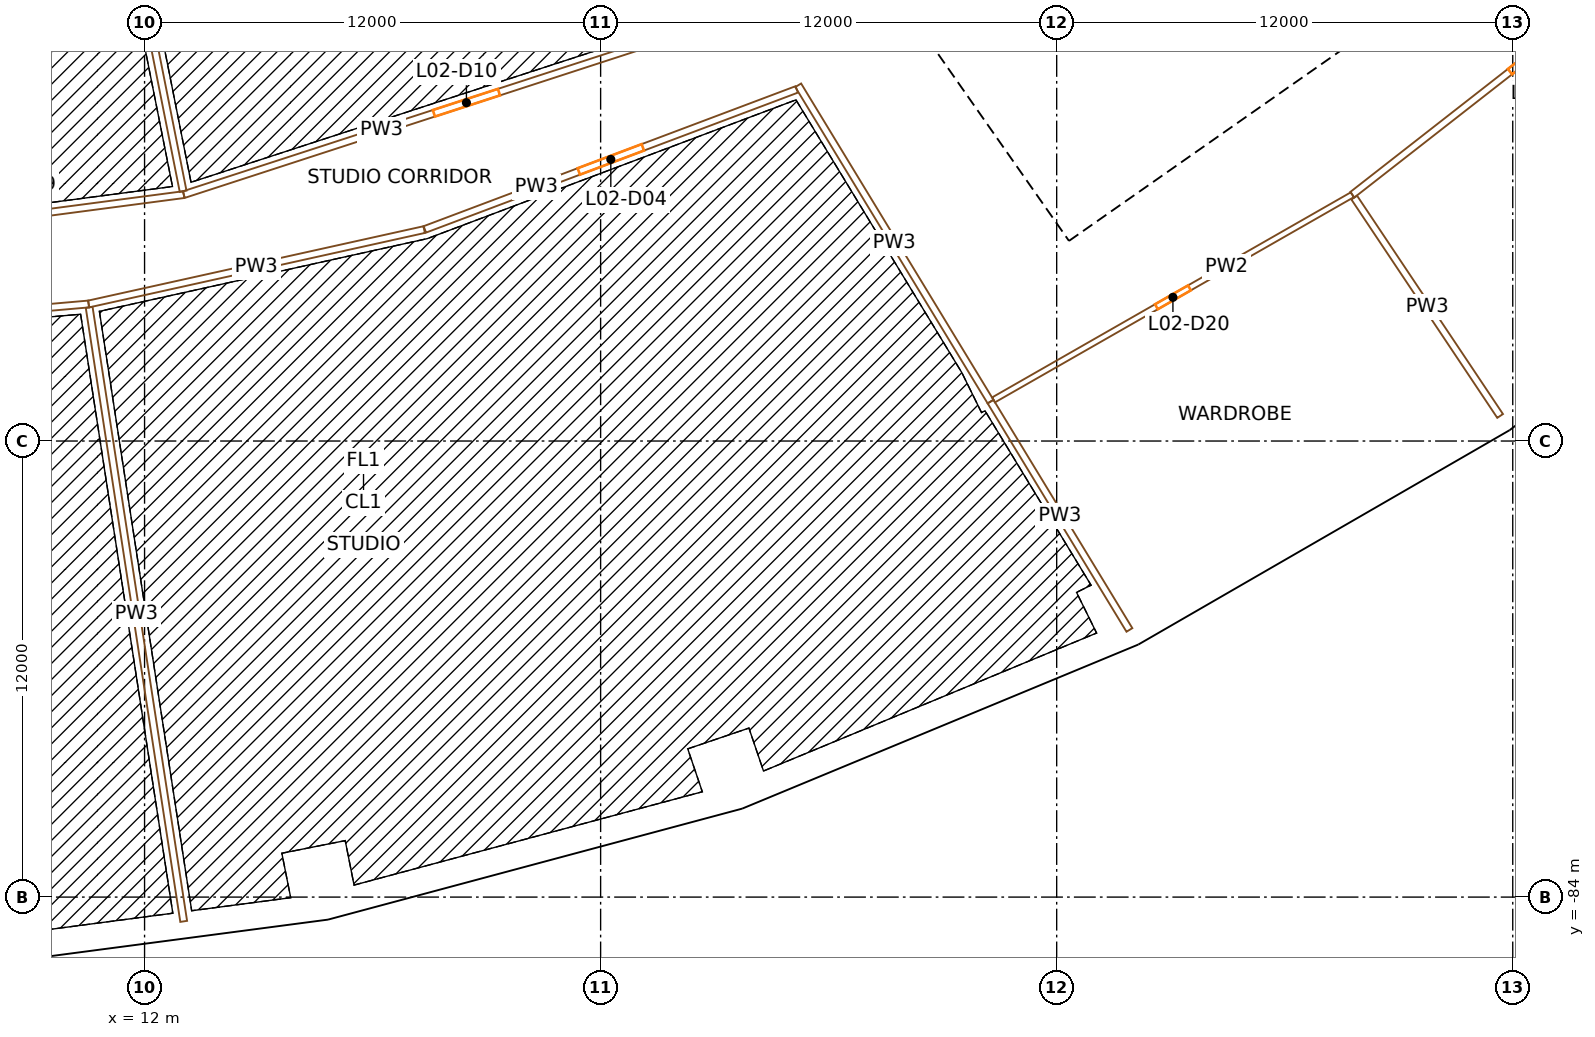
"""IFC4 building model, lengths in metres.
Left out: names, types, materials, properties, quantities, classifications, styles, units other than length and angle.
Written with IfcOpenShell. Run it as: python <this file> out.ifc"""

import sys

from ifc_helpers import new_model, si_unit, direction, frame, frame_2d, origin, origin_2d, place, context, subcontext, project, spatial, rectangle, extrude, element, fill, save


model = new_model("IFC4")
c1 = context("Model", 3, precision=1e-05, world=origin(), true_north=direction((0.0, 1.0)))
c2 = subcontext(c1, "Body", "Model", "MODEL_VIEW")
j1 = project(units=[si_unit("LENGTHUNIT", "METRE"), si_unit("PLANEANGLEUNIT", "RADIAN")], contexts=[c1])
p1 = place(None, origin())
s1 = spatial("IfcSite", under=j1, at=p1, CompositionType="ELEMENT")
p2 = place(p1, origin())
s2 = spatial("IfcBuilding", under=s1, at=p2, CompositionType="ELEMENT")
p3 = place(p2, frame((0.0, 0.0, 18.0)))
s3 = spatial("IfcBuildingStorey", under=s2, at=p3, CompositionType="ELEMENT", Elevation=18.0)
p4 = place(p3, frame((15.168, -76.256, 0.0), z_axis=(0.0, 0.0, 1.0), x_axis=(0.980785280403, 0.195090322016, 0.0)))
e1 = element("IfcColumn", 1, at=p4, inside=s3, PredefinedType="COLUMN", context=c2, shape_type="SweptSolid", body=[
    extrude(rectangle(XDim=1.4, YDim=1.8, at=origin_2d()), origin(), (0.0, 0.0, 1.0), 9.0),
])
p5 = place(p3, frame((16.631, -83.612, 0.0), z_axis=(0.0, 0.0, 1.0), x_axis=(0.980785280403, 0.195090322016, 0.0)))
e2 = element("IfcColumn", 2, at=p5, inside=s3, PredefinedType="COLUMN", context=c2, shape_type="SweptSolid", body=[
    extrude(rectangle(XDim=1.1, YDim=1.3, at=origin_2d()), origin(), (0.0, 0.0, 1.0), 9.0),
])
p6 = place(p3, frame((24.992, -73.624, 0.0), z_axis=(0.0, 0.0, 1.0), x_axis=(0.946930129495, 0.321439465303, 0.0)))
e3 = element("IfcColumn", 3, at=p6, inside=s3, PredefinedType="COLUMN", context=c2, shape_type="SweptSolid", body=[
    extrude(rectangle(XDim=1.4, YDim=1.8, at=origin_2d()), origin(), (0.0, 0.0, 1.0), 9.0),
])
p7 = place(p3, frame((27.403, -80.726, 0.0), z_axis=(0.0, 0.0, 1.0), x_axis=(0.946930129495, 0.321439465303, 0.0)))
e4 = element("IfcColumn", 4, at=p7, inside=s3, PredefinedType="COLUMN", context=c2, shape_type="SweptSolid", body=[
    extrude(rectangle(XDim=1.1, YDim=1.3, at=origin_2d()), origin(), (0.0, 0.0, 1.0), 9.0),
])
p8 = place(p3, frame((34.388, -69.732, 0.0), z_axis=(0.0, 0.0, 1.0), x_axis=(0.896872741533, 0.442288690219, 0.0)))
e5 = element("IfcColumn", 5, at=p8, inside=s3, PredefinedType="COLUMN", context=c2, shape_type="SweptSolid", body=[
    extrude(rectangle(XDim=1.4, YDim=1.8, at=origin_2d()), origin(), (0.0, 0.0, 1.0), 9.0),
])
p9 = place(p3, frame((37.705, -76.458, 0.0), z_axis=(0.0, 0.0, 1.0), x_axis=(0.896872741533, 0.442288690219, 0.0)))
e6 = element("IfcColumn", 6, at=p9, inside=s3, PredefinedType="COLUMN", context=c2, shape_type="SweptSolid", body=[
    extrude(rectangle(XDim=1.1, YDim=1.3, at=origin_2d()), origin(), (0.0, 0.0, 1.0), 9.0),
])
p10 = place(p3, frame((43.196, -64.647, 0.0), z_axis=(0.0, 0.0, 1.0), x_axis=(0.831469612303, 0.55557023302, 0.0)))
e7 = element("IfcColumn", 7, at=p10, inside=s3, PredefinedType="COLUMN", context=c2, shape_type="SweptSolid", body=[
    extrude(rectangle(XDim=1.4, YDim=1.8, at=origin_2d()), origin(), (0.0, 0.0, 1.0), 9.0),
])
p11 = place(p3, frame((47.362, -70.883, 0.0), z_axis=(0.0, 0.0, 1.0), x_axis=(0.831469612303, 0.55557023302, 0.0)))
e8 = element("IfcColumn", 8, at=p11, inside=s3, PredefinedType="COLUMN", context=c2, shape_type="SweptSolid", body=[
    extrude(rectangle(XDim=1.1, YDim=1.3, at=origin_2d()), origin(), (0.0, 0.0, 1.0), 9.0),
])
p12 = place(p3, frame((36.717, -66.337, 0.0), z_axis=(0.0, 0.0, 1.0), x_axis=(-0.573577477574, 0.819151315216, 0.0)))
e9 = element("IfcWall", 9, at=p12, inside=s3, PredefinedType="SHEAR", context=c2, shape_type="SweptSolid", body=[
    extrude(rectangle(XDim=14.8, YDim=0.9, at=frame_2d((7.4, 0.0))), origin(), (0.0, 0.0, 1.0), 8.6),
])
p13 = place(p12, frame((6.2, 0.0, 0.0)))
e10 = element("IfcOpeningElement", 10, at=p13, cuts=e9, PredefinedType="OPENING", context=c2, shape_type="SweptSolid", body=[
    extrude(rectangle(XDim=2.4, YDim=2.1, at=frame_2d((1.2, 1.05))), frame((0.0, 0.46, 0.0), z_axis=(0.0, -1.0, 0.0), x_axis=(1.0, 0.0, 0.0)), (0.0, 0.0, 1.0), 0.92),
])
p14 = place(p3, frame((36.827, -65.71, 0.0), z_axis=(0.0, 0.0, 1.0), x_axis=(0.819153391756, 0.573574511963, 0.0)))
e11 = element("IfcWall", 11, at=p14, inside=s3, PredefinedType="SHEAR", context=c2, shape_type="SweptSolid", body=[
    extrude(rectangle(XDim=15.045, YDim=0.9, at=frame_2d((7.523, 0.0))), origin(), (0.0, 0.0, 1.0), 8.6),
])
p15 = place(p14, frame((1.05, 0.0, 0.0)))
e12 = element("IfcOpeningElement", 12, at=p15, cuts=e11, PredefinedType="OPENING", context=c2, shape_type="SweptSolid", body=[
    extrude(rectangle(XDim=1.0, YDim=2.1, at=frame_2d((0.5, 1.05))), frame((0.0, 0.46, 0.0), z_axis=(0.0, -1.0, 0.0), x_axis=(1.0, 0.0, 0.0)), (0.0, 0.0, 1.0), 0.92),
])
p16 = place(p14, frame((3.625, 0.0, 0.0)))
e13 = element("IfcOpeningElement", 13, at=p16, cuts=e11, PredefinedType="OPENING", context=c2, shape_type="SweptSolid", body=[
    extrude(rectangle(XDim=1.0, YDim=2.1, at=frame_2d((0.5, 1.05))), frame((0.0, 0.46, 0.0), z_axis=(0.0, -1.0, 0.0), x_axis=(1.0, 0.0, 0.0)), (0.0, 0.0, 1.0), 0.92),
])
p17 = place(p14, frame((6.075, 0.0, 0.0)))
e14 = element("IfcOpeningElement", 14, at=p17, cuts=e11, PredefinedType="OPENING", context=c2, shape_type="SweptSolid", body=[
    extrude(rectangle(XDim=1.0, YDim=2.1, at=frame_2d((0.5, 1.05))), frame((0.0, 0.46, 0.0), z_axis=(0.0, -1.0, 0.0), x_axis=(1.0, 0.0, 0.0)), (0.0, 0.0, 1.0), 0.92),
])
p18 = place(p14, frame((13.495, 0.0, 0.0)))
e15 = element("IfcOpeningElement", 15, at=p18, cuts=e11, PredefinedType="OPENING", context=c2, shape_type="SweptSolid", body=[
    extrude(rectangle(XDim=1.1, YDim=2.1, at=frame_2d((0.55, 1.05))), frame((0.0, 0.46, 0.0), z_axis=(0.0, -1.0, 0.0), x_axis=(1.0, 0.0, 0.0)), (0.0, 0.0, 1.0), 0.92),
])
p19 = place(p3, frame((35.221, -63.417, 0.0), z_axis=(0.0, 0.0, 1.0), x_axis=(0.819166993208, 0.573555086491, 0.0)))
e16 = element("IfcWall", 16, at=p19, inside=s3, PredefinedType="SOLIDWALL", context=c2, shape_type="SweptSolid", body=[
    extrude(rectangle(XDim=7.95, YDim=0.3, at=frame_2d((3.975, 0.0))), origin(), (0.0, 0.0, 1.0), 8.6),
])
p20 = place(p3, frame((37.929, -61.704, 0.0), z_axis=(0.0, 0.0, 1.0), x_axis=(0.573559170999, -0.819164133348, 0.0)))
e17 = element("IfcWall", 17, at=p20, inside=s3, PredefinedType="PLUMBINGWALL", context=c2, shape_type="SweptSolid", body=[
    extrude(rectangle(XDim=2.2, YDim=0.1, at=frame_2d((1.1, 0.0))), origin(), (0.0, 0.0, 1.0), 8.6),
])
p21 = place(p3, frame((39.485, -60.614, 0.0), z_axis=(0.0, 0.0, 1.0), x_axis=(0.573507030513, -0.819200638399, 0.0)))
e18 = element("IfcWall", 18, at=p21, inside=s3, PredefinedType="PLUMBINGWALL", context=c2, shape_type="SweptSolid", body=[
    extrude(rectangle(XDim=2.2, YDim=0.1, at=frame_2d((1.1, 0.0))), origin(), (0.0, 0.0, 1.0), 8.6),
])
p22 = place(p3, frame((5.685, -85.833, 0.0), z_axis=(0.0, 0.0, 1.0), x_axis=(0.991447502826, 0.130506126829, 0.0)))
e19 = element("IfcWall", 19, at=p22, inside=s3, PredefinedType="SOLIDWALL", context=c2, shape_type="SweptSolid", body=[
    extrude(rectangle(XDim=11.135, YDim=0.45, at=frame_2d((5.567, 0.0))), origin(), (0.0, 0.0, 1.0), 7.7),
])
p23 = place(p3, frame((16.754, -84.379, 0.0), z_axis=(0.0, 0.0, 1.0), x_axis=(0.965923678926, 0.258827059038, 0.0)))
e20 = element("IfcWall", 20, at=p23, inside=s3, PredefinedType="SOLIDWALL", context=c2, shape_type="SweptSolid", body=[
    extrude(rectangle(XDim=11.312, YDim=0.45, at=frame_2d((5.656, 0.0))), origin(), (0.0, 0.0, 1.0), 7.7),
])
p24 = place(p3, frame((27.706, -81.437, 0.0), z_axis=(0.0, 0.0, 1.0), x_axis=(0.923874126662, 0.382696482978, 0.0)))
e21 = element("IfcWall", 21, at=p24, inside=s3, PredefinedType="SOLIDWALL", context=c2, shape_type="SweptSolid", body=[
    extrude(rectangle(XDim=11.135, YDim=0.45, at=frame_2d((5.567, 0.0))), origin(), (0.0, 0.0, 1.0), 7.7),
])
p25 = place(p3, frame((38.022, -77.168, 0.0), z_axis=(0.0, 0.0, 1.0), x_axis=(0.866024577697, 0.500001430823, 0.0)))
e22 = element("IfcWall", 22, at=p25, inside=s3, PredefinedType="SOLIDWALL", context=c2, shape_type="SweptSolid", body=[
    extrude(rectangle(XDim=11.312, YDim=0.45, at=frame_2d((5.656, 0.0))), origin(), (0.0, 0.0, 1.0), 7.7),
])
p26 = place(p3, frame((47.839, -71.491, 0.0), z_axis=(0.0, 0.0, 1.0), x_axis=(0.793355377778, 0.608758773695, 0.0)))
e23 = element("IfcWall", 23, at=p26, inside=s3, PredefinedType="SOLIDWALL", context=c2, shape_type="SweptSolid", body=[
    extrude(rectangle(XDim=11.135, YDim=0.45, at=frame_2d((5.567, 0.0))), origin(), (0.0, 0.0, 1.0), 7.7),
])
p27 = place(p3, frame((1.521, -69.183, 0.0), z_axis=(0.0, 0.0, 1.0), x_axis=(0.996192105404, 0.087185372228, 0.0)))
e24 = element("IfcWall", 24, at=p27, inside=s3, PredefinedType="PARTITIONING", context=c2, shape_type="SweptSolid", body=[
    extrude(rectangle(XDim=9.042, YDim=0.18, at=frame_2d((4.521, 0.0))), origin(), (0.0, 0.0, 1.0), 7.6),
])
p28 = place(p3, frame((4.369, -66.657, 0.0), z_axis=(0.0, 0.0, 1.0), x_axis=(0.991443260322, 0.130538352841, 0.0)))
e25 = element("IfcWall", 25, at=p28, inside=s3, PredefinedType="PARTITIONING", context=c2, shape_type="SweptSolid", body=[
    extrude(rectangle(XDim=8.738, YDim=0.18, at=frame_2d((4.369, 0.0))), origin(), (0.0, 0.0, 1.0), 7.6),
])
p29 = place(p28, frame((3.869, 0.0, 0.0)))
e26 = element("IfcOpeningElement", 26, at=p29, cuts=e25, PredefinedType="OPENING", context=c2, shape_type="SweptSolid", body=[
    extrude(rectangle(XDim=1.0, YDim=2.1, at=frame_2d((0.5, 1.05))), frame((0.0, 0.1, 0.0), z_axis=(0.0, -1.0, 0.0), x_axis=(1.0, 0.0, 0.0)), (0.0, 0.0, 1.0), 0.2),
])
p30 = place(p3, frame((9.793, -49.235, 0.0), z_axis=(0.0, 0.0, 1.0), x_axis=(0.195089444663, -0.980785454919, 0.0)))
e27 = element("IfcWall", 27, at=p30, inside=s3, PredefinedType="PARTITIONING", context=c2, shape_type="SweptSolid", body=[
    extrude(rectangle(XDim=16.51, YDim=0.18, at=frame_2d((8.255, 0.0))), origin(), (0.0, 0.0, 1.0), 7.6),
])
p31 = place(p3, frame((10.529, -68.394, 0.0), z_axis=(0.0, 0.0, 1.0), x_axis=(0.976293034631, 0.216453021533, 0.0)))
e28 = element("IfcWall", 28, at=p31, inside=s3, PredefinedType="PARTITIONING", context=c2, shape_type="SweptSolid", body=[
    extrude(rectangle(XDim=9.042, YDim=0.18, at=frame_2d((4.521, 0.0))), origin(), (0.0, 0.0, 1.0), 7.6),
])
p32 = place(p3, frame((13.032, -65.516, 0.0), z_axis=(0.0, 0.0, 1.0), x_axis=(0.950997351979, 0.309199024141, 0.0)))
e29 = element("IfcWall", 29, at=p32, inside=s3, PredefinedType="PARTITIONING", context=c2, shape_type="SweptSolid", body=[
    extrude(rectangle(XDim=15.639, YDim=0.18, at=frame_2d((7.82, 0.0))), origin(), (0.0, 0.0, 1.0), 7.6),
])
p33 = place(p32, frame((6.92, 0.0, 0.0)))
e30 = element("IfcOpeningElement", 30, at=p33, cuts=e29, PredefinedType="OPENING", context=c2, shape_type="SweptSolid", body=[
    extrude(rectangle(XDim=1.8, YDim=2.1, at=frame_2d((0.9, 1.05))), frame((0.0, 0.1, 0.0), z_axis=(0.0, -1.0, 0.0), x_axis=(1.0, 0.0, 0.0)), (0.0, 0.0, 1.0), 0.2),
])
p34 = place(p3, frame((13.03, -84.639, 0.0), z_axis=(0.0, 0.0, 1.0), x_axis=(-0.152152583727, 0.988357016096, 0.0)))
e31 = element("IfcWall", 31, at=p34, inside=s3, PredefinedType="PARTITIONING", context=c2, shape_type="SweptSolid", body=[
    extrude(rectangle(XDim=16.346, YDim=0.18, at=frame_2d((8.173, 0.0))), origin(), (0.0, 0.0, 1.0), 7.6),
])
p35 = place(p3, frame((29.161, -62.748, 0.0), z_axis=(0.0, 0.0, 1.0), x_axis=(-0.935897657387, -0.352272018328, 0.0)))
e32 = element("IfcWall", 32, at=p35, inside=s3, PredefinedType="PARTITIONING", context=c2, shape_type="SweptSolid", body=[
    extrude(rectangle(XDim=10.457, YDim=0.18, at=frame_2d((5.229, 0.0))), origin(), (0.0, 0.0, 1.0), 7.6),
])
p36 = place(p35, frame((4.328, 0.0, 0.0)))
e33 = element("IfcOpeningElement", 33, at=p36, cuts=e32, PredefinedType="OPENING", context=c2, shape_type="SweptSolid", body=[
    extrude(rectangle(XDim=1.8, YDim=2.4, at=frame_2d((0.9, 1.2))), frame((0.0, 0.1, 0.0), z_axis=(0.0, -1.0, 0.0), x_axis=(1.0, 0.0, 0.0)), (0.0, 0.0, 1.0), 0.2),
])
p37 = place(p3, frame((29.199, -62.639, 0.0), z_axis=(0.0, 0.0, 1.0), x_axis=(0.519569231187, -0.854428355103, 0.0)))
e34 = element("IfcWall", 34, at=p37, inside=s3, PredefinedType="PARTITIONING", context=c2, shape_type="SweptSolid", body=[
    extrude(rectangle(XDim=9.741, YDim=0.18, at=frame_2d((4.871, 0.0))), origin(), (0.0, 0.0, 1.0), 7.6),
])
p38 = place(p3, frame((34.26, -70.963, 0.0), z_axis=(0.0, 0.0, 1.0), x_axis=(0.519582317334, -0.854420397412, 0.0)))
e35 = element("IfcWall", 35, at=p38, inside=s3, PredefinedType="PARTITIONING", context=c2, shape_type="SweptSolid", body=[
    extrude(rectangle(XDim=7.032, YDim=0.18, at=frame_2d((3.516, 0.0))), origin(), (0.0, 0.0, 1.0), 7.6),
])
p39 = place(p3, frame((43.779, -65.52, 0.0), z_axis=(0.0, 0.0, 1.0), x_axis=(-0.868109106225, -0.496373427663, 0.0)))
e36 = element("IfcWall", 36, at=p39, inside=s3, PredefinedType="PARTITIONING", context=c2, shape_type="SweptSolid", body=[
    extrude(rectangle(XDim=10.875, YDim=0.15, at=frame_2d((5.438, 0.0))), origin(), (0.0, 0.0, 1.0), 7.6),
])
p40 = place(p39, frame((4.938, 0.0, 0.0)))
e37 = element("IfcOpeningElement", 37, at=p40, cuts=e36, PredefinedType="OPENING", context=c2, shape_type="SweptSolid", body=[
    extrude(rectangle(XDim=1.0, YDim=2.1, at=frame_2d((0.5, 1.05))), frame((0.0, 0.085, 0.0), z_axis=(0.0, -1.0, 0.0), x_axis=(1.0, 0.0, 0.0)), (0.0, 0.0, 1.0), 0.17),
])
p41 = place(p3, frame((52.865, -58.427, 0.0), z_axis=(0.0, 0.0, 1.0), x_axis=(-0.788252635542, -0.615351755146, 0.0)))
e38 = element("IfcWall", 38, at=p41, inside=s3, PredefinedType="PARTITIONING", context=c2, shape_type="SweptSolid", body=[
    extrude(rectangle(XDim=11.526, YDim=0.18, at=frame_2d((5.763, 0.0))), origin(), (0.0, 0.0, 1.0), 7.6),
])
p42 = place(p41, frame((5.263, 0.0, 0.0)))
e39 = element("IfcOpeningElement", 39, at=p42, cuts=e38, PredefinedType="OPENING", context=c2, shape_type="SweptSolid", body=[
    extrude(rectangle(XDim=1.0, YDim=2.1, at=frame_2d((0.5, 1.05))), frame((0.0, 0.1, 0.0), z_axis=(0.0, -1.0, 0.0), x_axis=(1.0, 0.0, 0.0)), (0.0, 0.0, 1.0), 0.2),
])
p43 = place(p3, frame((47.668, -71.34, 0.0), z_axis=(0.0, 0.0, 1.0), x_axis=(-0.555588604147, 0.831457336814, 0.0)))
e40 = element("IfcWall", 40, at=p43, inside=s3, PredefinedType="PARTITIONING", context=c2, shape_type="SweptSolid", body=[
    extrude(rectangle(XDim=6.91, YDim=0.18, at=frame_2d((3.455, 0.0))), origin(), (0.0, 0.0, 1.0), 7.6),
])
p44 = place(p15, origin())
e41 = element("IfcDoor", 41, at=p44, inside=s3, OperationType="SINGLE_SWING_RIGHT", PredefinedType="DOOR", context=c2, shape_type="SweptSolid", body=[
    extrude(rectangle(XDim=1.0, YDim=2.1, at=frame_2d((0.5, 1.05))), frame((0.0, 0.025, 0.0), z_axis=(0.0, -1.0, 0.0), x_axis=(1.0, 0.0, 0.0)), (0.0, 0.0, 1.0), 0.05),
])
fill(e12, e41)
p45 = place(p16, origin())
e42 = element("IfcDoor", 42, at=p45, inside=s3, OperationType="SINGLE_SWING_LEFT", PredefinedType="DOOR", context=c2, shape_type="SweptSolid", body=[
    extrude(rectangle(XDim=1.0, YDim=2.1, at=frame_2d((0.5, 1.05))), frame((0.0, 0.025, 0.0), z_axis=(0.0, -1.0, 0.0), x_axis=(1.0, 0.0, 0.0)), (0.0, 0.0, 1.0), 0.05),
])
fill(e13, e42)
p46 = place(p17, origin())
e43 = element("IfcDoor", 43, at=p46, inside=s3, OperationType="SINGLE_SWING_RIGHT", PredefinedType="DOOR", context=c2, shape_type="SweptSolid", body=[
    extrude(rectangle(XDim=1.0, YDim=2.1, at=frame_2d((0.5, 1.05))), frame((0.0, 0.025, 0.0), z_axis=(0.0, -1.0, 0.0), x_axis=(1.0, 0.0, 0.0)), (0.0, 0.0, 1.0), 0.05),
])
fill(e14, e43)
p47 = place(p36, origin())
e44 = element("IfcDoor", 44, at=p47, inside=s3, OperationType="DOUBLE_DOOR_SINGLE_SWING", PredefinedType="DOOR", context=c2, shape_type="SweptSolid", body=[
    extrude(rectangle(XDim=1.8, YDim=2.4, at=frame_2d((0.9, 1.2))), frame((0.0, 0.025, 0.0), z_axis=(0.0, -1.0, 0.0), x_axis=(1.0, 0.0, 0.0)), (0.0, 0.0, 1.0), 0.05),
])
fill(e33, e44)
p48 = place(p33, origin())
e45 = element("IfcDoor", 45, at=p48, inside=s3, OperationType="DOUBLE_DOOR_SINGLE_SWING", PredefinedType="DOOR", context=c2, shape_type="SweptSolid", body=[
    extrude(rectangle(XDim=1.8, YDim=2.1, at=frame_2d((0.9, 1.05))), frame((0.0, 0.025, 0.0), z_axis=(0.0, -1.0, 0.0), x_axis=(1.0, 0.0, 0.0)), (0.0, 0.0, 1.0), 0.05),
])
fill(e30, e45)
p49 = place(p40, origin())
e46 = element("IfcDoor", 46, at=p49, inside=s3, OperationType="SINGLE_SWING_RIGHT", PredefinedType="DOOR", context=c2, shape_type="SweptSolid", body=[
    extrude(rectangle(XDim=1.0, YDim=2.1, at=frame_2d((0.5, 1.05))), frame((0.0, 0.025, 0.0), z_axis=(0.0, -1.0, 0.0), x_axis=(1.0, 0.0, 0.0)), (0.0, 0.0, 1.0), 0.05),
])
fill(e37, e46)
p50 = place(p42, origin())
e47 = element("IfcDoor", 47, at=p50, inside=s3, OperationType="SINGLE_SWING_RIGHT", PredefinedType="DOOR", context=c2, shape_type="SweptSolid", body=[
    extrude(rectangle(XDim=1.0, YDim=2.1, at=frame_2d((0.5, 1.05))), frame((0.0, 0.025, 0.0), z_axis=(0.0, -1.0, 0.0), x_axis=(1.0, 0.0, 0.0)), (0.0, 0.0, 1.0), 0.05),
])
fill(e39, e47)
save(model, sys.argv[1])
